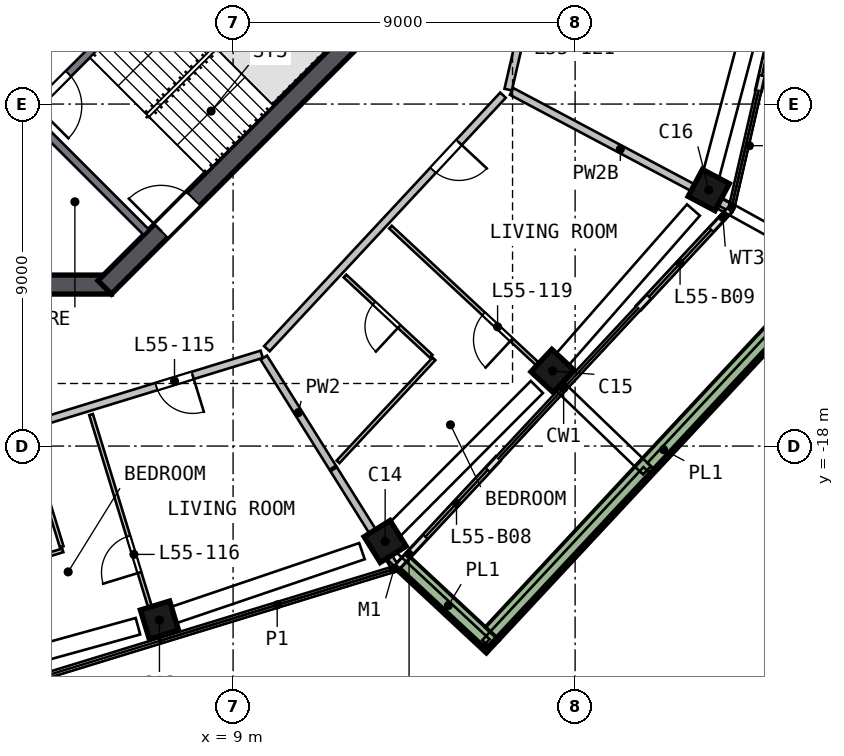
"""IFC4 building model, lengths in metres.
Left out: names, types, materials, properties, quantities, classifications, styles, units other than length and angle.
Written with IfcOpenShell. Run it as: python <this file> out.ifc"""

import sys

from ifc_helpers import new_model, si_unit, direction, frame, frame_2d, origin, origin_2d, place, context, subcontext, project, spatial, rectangle, extrude, element, fill, save


model = new_model("IFC4")
c1 = context("Model", 3, precision=1e-05, world=origin(), true_north=direction((0.0, 1.0)))
c2 = subcontext(c1, "Body", "Model", "MODEL_VIEW")
j1 = project(units=[si_unit("LENGTHUNIT", "METRE"), si_unit("PLANEANGLEUNIT", "RADIAN")], contexts=[c1])
p1 = place(None, origin())
s1 = spatial("IfcSite", under=j1, at=p1, CompositionType="ELEMENT")
p2 = place(p1, origin())
s2 = spatial("IfcBuilding", under=s1, at=p2, CompositionType="ELEMENT")
p3 = place(p2, frame((0.0, 0.0, 227.0)))
s3 = spatial("IfcBuildingStorey", under=s2, at=p3, CompositionType="ELEMENT", Elevation=227.0)
p4 = place(p3, frame((6.933, -22.62, 0.0), z_axis=(0.107304475, 0.033841596, 0.993650087), x_axis=(0.950141415, 0.290813838, -0.112510462)))
e1 = element("IfcColumn", 1, at=p4, inside=s3, PredefinedType="COLUMN", context=c2, shape_type="SweptSolid", body=[
    extrude(rectangle(XDim=0.8, YDim=0.8, at=origin_2d()), origin(), (0.0, 0.0, 1.0), 3.21),
])
p5 = place(p3, frame((12.884, -20.587, 0.0), z_axis=(0.097384519, 0.062110189, 0.993306891), x_axis=(-0.841980994, -0.52699861, 0.115500958)))
e2 = element("IfcColumn", 2, at=p5, inside=s3, PredefinedType="COLUMN", context=c2, shape_type="SweptSolid", body=[
    extrude(rectangle(XDim=0.8, YDim=0.8, at=origin_2d()), origin(), (0.0, 0.0, 1.0), 3.211),
])
p6 = place(p3, frame((17.314, -16.123, 0.0), z_axis=(0.075972627, 0.082969105, 0.993651995), x_axis=(0.677234205, 0.727116922, -0.112493612)))
e3 = element("IfcColumn", 3, at=p6, inside=s3, PredefinedType="COLUMN", context=c2, shape_type="SweptSolid", body=[
    extrude(rectangle(XDim=0.8, YDim=0.8, at=origin_2d()), origin(), (0.0, 0.0, 1.0), 3.21),
])
p7 = place(p3, frame((21.451, -11.386, 0.0), z_axis=(0.053292013, 0.10240277, 0.993314469), x_axis=(-0.466021288, -0.877210773, 0.115435775)))
e4 = element("IfcColumn", 4, at=p7, inside=s3, PredefinedType="COLUMN", context=c2, shape_type="SweptSolid", body=[
    extrude(rectangle(XDim=0.8, YDim=0.8, at=origin_2d()), origin(), (0.0, 0.0, 1.0), 3.211),
])
p8 = place(p3, frame((-5.799, -13.75, 0.0), z_axis=(0.0, 0.0, 1.0), x_axis=(1.0, 0.0, 0.0)))
e5 = element("IfcWall", 5, at=p8, inside=s3, PredefinedType="SHEAR", context=c2, shape_type="SweptSolid", body=[
    extrude(rectangle(XDim=11.598, YDim=0.5, at=frame_2d((5.799, 0.0))), origin(), (0.0, 0.0, 1.0), 3.5),
])
p9 = place(p3, frame((5.622, -13.823, 0.0), z_axis=(0.0, 0.0, 1.0), x_axis=(0.707106781, 0.707106781, 0.0)))
e6 = element("IfcWall", 6, at=p9, inside=s3, PredefinedType="SHEAR", context=c2, shape_type="SweptSolid", body=[
    extrude(rectangle(XDim=11.598, YDim=0.5, at=frame_2d((5.799, 0.0))), origin(), (0.0, 0.0, 1.0), 3.5),
])
p10 = place(p9, frame((2.099, 0.0, 0.0)))
e7 = element("IfcOpeningElement", 7, at=p10, cuts=e6, PredefinedType="OPENING", context=c2, shape_type="SweptSolid", body=[
    extrude(rectangle(XDim=1.2, YDim=2.1, at=frame_2d((0.6, 1.05))), frame((0.0, 0.26, 0.0), z_axis=(0.0, -1.0, 0.0), x_axis=(1.0, 0.0, 0.0)), (0.0, 0.0, 1.0), 0.52),
])
p11 = place(p3, frame((13.337, -21.164, 0.0), z_axis=(0.0, 0.0, 1.0), x_axis=(0.681473392, 0.73184289, 0.0)))
e8 = element("IfcWall", 8, at=p11, inside=s3, PredefinedType="SOLIDWALL", context=c2, shape_type="SweptSolid", body=[
    extrude(rectangle(XDim=3.863, YDim=0.15, at=frame_2d((1.932, 0.0))), origin(), (0.0, 0.0, 1.0), 2.525),
])
p12 = place(p11, frame((1.063, 0.0, 0.0)))
e9 = element("IfcOpeningElement", 9, at=p12, cuts=e8, PredefinedType="OPENING", context=c2, shape_type="SweptSolid", body=[
    extrude(rectangle(XDim=2.4, YDim=2.4, at=frame_2d((1.2, 1.2))), frame((0.0, 0.085, 0.0), z_axis=(0.0, -1.0, 0.0), x_axis=(1.0, 0.0, 0.0)), (0.0, 0.0, 1.0), 0.17),
])
p13 = place(p3, frame((19.671, -14.361, 0.0), z_axis=(0.0, 0.0, 1.0), x_axis=(0.681543353, 0.731777738, 0.0)))
e10 = element("IfcWall", 10, at=p13, inside=s3, PredefinedType="SOLIDWALL", context=c2, shape_type="SweptSolid", body=[
    extrude(rectangle(XDim=3.504, YDim=0.15, at=frame_2d((1.752, 0.0))), origin(), (0.0, 0.0, 1.0), 2.525),
])
p14 = place(p13, frame((0.4, 0.0, 0.0)))
e11 = element("IfcOpeningElement", 11, at=p14, cuts=e10, PredefinedType="OPENING", context=c2, shape_type="SweptSolid", body=[
    extrude(rectangle(XDim=2.4, YDim=2.4, at=frame_2d((1.2, 1.2))), frame((0.0, 0.085, 0.0), z_axis=(0.0, -1.0, 0.0), x_axis=(1.0, 0.0, 0.0)), (0.0, 0.0, 1.0), 0.17),
])
p15 = place(p3, frame((22.827, -8.64, 0.0), z_axis=(0.0, 0.0, 1.0), x_axis=(0.224302968, 0.97451946, 0.0)))
e12 = element("IfcWall", 12, at=p15, inside=s3, PredefinedType="SOLIDWALL", context=c2, shape_type="SweptSolid", body=[
    extrude(rectangle(XDim=3.3, YDim=0.15, at=frame_2d((1.65, 0.0))), origin(), (0.0, 0.0, 1.0), 2.525),
])
p16 = place(p15, frame((0.4, 0.0, 0.0)))
e13 = element("IfcOpeningElement", 13, at=p16, cuts=e12, PredefinedType="OPENING", context=c2, shape_type="SweptSolid", body=[
    extrude(rectangle(XDim=2.4, YDim=2.4, at=frame_2d((1.2, 1.2))), frame((0.0, 0.085, 0.0), z_axis=(0.0, -1.0, 0.0), x_axis=(1.0, 0.0, 0.0)), (0.0, 0.0, 1.0), 0.17),
])
p17 = place(p3, frame((13.494, -21.106, 0.0), z_axis=(0.0, 0.0, 1.0), x_axis=(0.731844096, -0.681472097, 0.0)))
e14 = element("IfcWall", 14, at=p17, inside=s3, PredefinedType="SOLIDWALL", context=c2, shape_type="SweptSolid", body=[
    extrude(rectangle(XDim=3.199, YDim=0.5, at=frame_2d((1.6, 0.0))), origin(), (0.0, 0.0, 1.0), 0.7),
])
p18 = place(p3, frame((15.823, -22.933, 0.0), z_axis=(0.0, 0.0, 1.0), x_axis=(0.681484345, 0.731832691, 0.0)))
e15 = element("IfcWall", 15, at=p18, inside=s3, PredefinedType="SOLIDWALL", context=c2, shape_type="SweptSolid", body=[
    extrude(rectangle(XDim=13.223, YDim=0.5, at=frame_2d((6.612, 0.0))), origin(), (0.0, 0.0, 1.0), 0.7),
])
p19 = place(p3, frame((9.629, -3.24, 0.0), z_axis=(0.0, 0.0, 1.0), x_axis=(-0.707120946, -0.707092617, 0.0)))
e16 = element("IfcWall", 16, at=p19, inside=s3, PredefinedType="SOLIDWALL", context=c2, shape_type="SweptSolid", body=[
    extrude(rectangle(XDim=8.618, YDim=0.2, at=frame_2d((4.309, 0.0))), origin(), (0.0, 0.0, 1.0), 3.19),
])
p20 = place(p19, frame((7.018, 0.0, 0.0)))
e17 = element("IfcOpeningElement", 17, at=p20, cuts=e16, PredefinedType="OPENING", context=c2, shape_type="SweptSolid", body=[
    extrude(rectangle(XDim=1.2, YDim=2.1, at=frame_2d((0.6, 1.05))), frame((0.0, 0.11, 0.0), z_axis=(0.0, -1.0, 0.0), x_axis=(1.0, 0.0, 0.0)), (0.0, 0.0, 1.0), 0.22),
])
p21 = place(p3, frame((3.677, -9.334, 0.0), z_axis=(0.0, 0.0, 1.0), x_axis=(0.707078393, -0.707135168, 0.0)))
e18 = element("IfcWall", 18, at=p21, inside=s3, PredefinedType="SOLIDWALL", context=c2, shape_type="SweptSolid", body=[
    extrude(rectangle(XDim=4.3, YDim=0.2, at=frame_2d((2.15, 0.0))), origin(), (0.0, 0.0, 1.0), 3.19),
])
p22 = place(p3, frame((9.753, -15.584, 0.0), z_axis=(0.0, 0.0, 1.0), x_axis=(-0.956105904, -0.293021329, 0.0)))
e19 = element("IfcWall", 19, at=p22, inside=s3, PredefinedType="SOLIDWALL", context=c2, shape_type="SweptSolid", body=[
    extrude(rectangle(XDim=9.317, YDim=0.2, at=frame_2d((4.658, 0.0))), origin(), (0.0, 0.0, 1.0), 3.19),
])
p23 = place(p22, frame((1.9, 0.0, 0.0)))
e20 = element("IfcOpeningElement", 20, at=p23, cuts=e19, PredefinedType="OPENING", context=c2, shape_type="SweptSolid", body=[
    extrude(rectangle(XDim=1.0, YDim=2.1, at=frame_2d((0.5, 1.05))), frame((0.0, 0.11, 0.0), z_axis=(0.0, -1.0, 0.0), x_axis=(1.0, 0.0, 0.0)), (0.0, 0.0, 1.0), 0.22),
])
p24 = place(p3, frame((16.103, -8.766, 0.0), z_axis=(0.0, 0.0, 1.0), x_axis=(-0.681485798, -0.731831338, 0.0)))
e21 = element("IfcWall", 21, at=p24, inside=s3, PredefinedType="SOLIDWALL", context=c2, shape_type="SweptSolid", body=[
    extrude(rectangle(XDim=9.117, YDim=0.2, at=frame_2d((4.558, 0.0))), origin(), (0.0, 0.0, 1.0), 3.19),
])
p25 = place(p24, frame((1.7, 0.0, 0.0)))
e22 = element("IfcOpeningElement", 22, at=p25, cuts=e21, PredefinedType="OPENING", context=c2, shape_type="SweptSolid", body=[
    extrude(rectangle(XDim=1.0, YDim=2.1, at=frame_2d((0.5, 1.05))), frame((0.0, 0.11, 0.0), z_axis=(0.0, -1.0, 0.0), x_axis=(1.0, 0.0, 0.0)), (0.0, 0.0, 1.0), 0.22),
])
p26 = place(p3, frame((18.328, 0.459, 0.0), z_axis=(0.0, 0.0, 1.0), x_axis=(-0.224285322, -0.974523522, 0.0)))
e23 = element("IfcWall", 23, at=p26, inside=s3, PredefinedType="SOLIDWALL", context=c2, shape_type="SweptSolid", body=[
    extrude(rectangle(XDim=9.317, YDim=0.2, at=frame_2d((4.658, 0.0))), origin(), (0.0, 0.0, 1.0), 3.19),
])
p27 = place(p26, frame((6.458, 0.0, 0.0)))
e24 = element("IfcOpeningElement", 24, at=p27, cuts=e23, PredefinedType="OPENING", context=c2, shape_type="SweptSolid", body=[
    extrude(rectangle(XDim=1.0, YDim=2.1, at=frame_2d((0.5, 1.05))), frame((0.0, 0.11, 0.0), z_axis=(0.0, -1.0, 0.0), x_axis=(1.0, 0.0, 0.0)), (0.0, 0.0, 1.0), 0.22),
])
p28 = place(p3, frame((9.808, -15.672, 0.0), z_axis=(0.0, 0.0, 1.0), x_axis=(0.530506006, -0.847681177, 0.0)))
e25 = element("IfcWall", 25, at=p28, inside=s3, PredefinedType="SOLIDWALL", context=c2, shape_type="SweptSolid", body=[
    extrude(rectangle(XDim=3.418, YDim=0.2, at=frame_2d((1.709, 0.0))), origin(), (0.0, 0.0, 1.0), 3.19),
])
p29 = place(p3, frame((11.646, -18.609, 0.0), z_axis=(0.0, 0.0, 1.0), x_axis=(0.530523518, -0.847670217, 0.0)))
e26 = element("IfcWall", 26, at=p29, inside=s3, PredefinedType="SOLIDWALL", context=c2, shape_type="SweptSolid", body=[
    extrude(rectangle(XDim=3.011, YDim=0.2, at=frame_2d((1.506, 0.0))), origin(), (0.0, 0.0, 1.0), 3.19),
])
p30 = place(p3, frame((16.33, -8.668, 0.0), z_axis=(0.0, 0.0, 1.0), x_axis=(0.883258213, -0.468886904, 0.0)))
e27 = element("IfcWall", 27, at=p30, inside=s3, PredefinedType="SOLIDWALL", context=c2, shape_type="SweptSolid", body=[
    extrude(rectangle(XDim=6.476, YDim=0.2, at=frame_2d((3.238, 0.0))), origin(), (0.0, 0.0, 1.0), 2.69),
])
p31 = place(p3, frame((0.978, -21.83, 0.0), z_axis=(0.0, 0.0, 1.0), x_axis=(0.956094847, 0.293057407, 0.0)))
e28 = element("IfcWall", 28, at=p31, inside=s3, PredefinedType="PARTITIONING", context=c2, shape_type="SweptSolid", body=[
    extrude(rectangle(XDim=3.704, YDim=0.1, at=frame_2d((1.852, 0.0))), origin(), (0.0, 0.0, 1.0), 3.19),
])
p32 = place(p3, frame((4.49, -20.649, 0.0), z_axis=(0.0, 0.0, 1.0), x_axis=(-0.293050781, 0.956096878, 0.0)))
e29 = element("IfcWall", 29, at=p32, inside=s3, PredefinedType="PARTITIONING", context=c2, shape_type="SweptSolid", body=[
    extrude(rectangle(XDim=3.1, YDim=0.1, at=frame_2d((1.55, 0.0))), origin(), (0.0, 0.0, 1.0), 3.19),
])
p33 = place(p32, frame((1.15, 0.0, 0.0)))
e30 = element("IfcOpeningElement", 30, at=p33, cuts=e29, PredefinedType="OPENING", context=c2, shape_type="SweptSolid", body=[
    extrude(rectangle(XDim=0.9, YDim=2.1, at=frame_2d((0.45, 1.05))), frame((0.0, 0.06, 0.0), z_axis=(0.0, -1.0, 0.0), x_axis=(1.0, 0.0, 0.0)), (0.0, 0.0, 1.0), 0.12),
])
p34 = place(p3, frame((7.065, -23.05, 0.0), z_axis=(0.0, 0.0, 1.0), x_axis=(-0.293042397, 0.956099448, 0.0)))
e31 = element("IfcWall", 31, at=p34, inside=s3, PredefinedType="PARTITIONING", context=c2, shape_type="SweptSolid", body=[
    extrude(rectangle(XDim=6.15, YDim=0.1, at=frame_2d((3.075, 0.0))), origin(), (0.0, 0.0, 1.0), 3.19),
])
p35 = place(p34, frame((1.8, 0.0, 0.0)))
e32 = element("IfcOpeningElement", 32, at=p35, cuts=e31, PredefinedType="OPENING", context=c2, shape_type="SweptSolid", body=[
    extrude(rectangle(XDim=1.0, YDim=2.1, at=frame_2d((0.5, 1.05))), frame((0.0, 0.06, 0.0), z_axis=(0.0, -1.0, 0.0), x_axis=(1.0, 0.0, 0.0)), (0.0, 0.0, 1.0), 0.12),
])
p36 = place(p3, frame((11.762, -18.417, 0.0), z_axis=(0.0, 0.0, 1.0), x_axis=(0.681479401, 0.731837295, 0.0)))
e33 = element("IfcWall", 33, at=p36, inside=s3, PredefinedType="PARTITIONING", context=c2, shape_type="SweptSolid", body=[
    extrude(rectangle(XDim=3.704, YDim=0.1, at=frame_2d((1.852, 0.0))), origin(), (0.0, 0.0, 1.0), 3.19),
])
p37 = place(p3, frame((14.213, -15.638, 0.0), z_axis=(0.0, 0.0, 1.0), x_axis=(-0.73185876, 0.681456349, 0.0)))
e34 = element("IfcWall", 34, at=p37, inside=s3, PredefinedType="PARTITIONING", context=c2, shape_type="SweptSolid", body=[
    extrude(rectangle(XDim=3.1, YDim=0.1, at=frame_2d((1.55, 0.0))), origin(), (0.0, 0.0, 1.0), 3.19),
])
p38 = place(p37, frame((1.15, 0.0, 0.0)))
e35 = element("IfcOpeningElement", 35, at=p38, cuts=e34, PredefinedType="OPENING", context=c2, shape_type="SweptSolid", body=[
    extrude(rectangle(XDim=0.9, YDim=2.1, at=frame_2d((0.45, 1.05))), frame((0.0, 0.06, 0.0), z_axis=(0.0, -1.0, 0.0), x_axis=(1.0, 0.0, 0.0)), (0.0, 0.0, 1.0), 0.12),
])
p39 = place(p3, frame((17.643, -16.429, 0.0), z_axis=(0.0, 0.0, 1.0), x_axis=(-0.731845502, 0.681470587, 0.0)))
e36 = element("IfcWall", 36, at=p39, inside=s3, PredefinedType="PARTITIONING", context=c2, shape_type="SweptSolid", body=[
    extrude(rectangle(XDim=6.15, YDim=0.1, at=frame_2d((3.075, 0.0))), origin(), (0.0, 0.0, 1.0), 3.19),
])
p40 = place(p39, frame((1.8, 0.0, 0.0)))
e37 = element("IfcOpeningElement", 37, at=p40, cuts=e36, PredefinedType="OPENING", context=c2, shape_type="SweptSolid", body=[
    extrude(rectangle(XDim=1.0, YDim=2.1, at=frame_2d((0.5, 1.05))), frame((0.0, 0.06, 0.0), z_axis=(0.0, -1.0, 0.0), x_axis=(1.0, 0.0, 0.0)), (0.0, 0.0, 1.0), 0.12),
])
p41 = place(p12, origin())
e38 = element("IfcDoor", 38, at=p41, inside=s3, OperationType="SLIDING_TO_LEFT", PredefinedType="DOOR", context=c2, shape_type="SweptSolid", body=[
    extrude(rectangle(XDim=2.4, YDim=2.4, at=frame_2d((1.2, 1.2))), frame((0.0, 0.025, 0.0), z_axis=(0.0, -1.0, 0.0), x_axis=(1.0, 0.0, 0.0)), (0.0, 0.0, 1.0), 0.05),
])
fill(e9, e38)
p42 = place(p14, origin())
e39 = element("IfcDoor", 39, at=p42, inside=s3, OperationType="SLIDING_TO_RIGHT", PredefinedType="DOOR", context=c2, shape_type="SweptSolid", body=[
    extrude(rectangle(XDim=2.4, YDim=2.4, at=frame_2d((1.2, 1.2))), frame((0.0, 0.025, 0.0), z_axis=(0.0, -1.0, 0.0), x_axis=(1.0, 0.0, 0.0)), (0.0, 0.0, 1.0), 0.05),
])
fill(e11, e39)
p43 = place(p16, origin())
e40 = element("IfcDoor", 40, at=p43, inside=s3, OperationType="SLIDING_TO_RIGHT", PredefinedType="DOOR", context=c2, shape_type="SweptSolid", body=[
    extrude(rectangle(XDim=2.4, YDim=2.4, at=frame_2d((1.2, 1.2))), frame((0.0, 0.025, 0.0), z_axis=(0.0, -1.0, 0.0), x_axis=(1.0, 0.0, 0.0)), (0.0, 0.0, 1.0), 0.05),
])
fill(e13, e40)
p44 = place(p20, origin())
e41 = element("IfcDoor", 41, at=p44, inside=s3, OperationType="SINGLE_SWING_RIGHT", PredefinedType="DOOR", context=c2, shape_type="SweptSolid", body=[
    extrude(rectangle(XDim=1.2, YDim=2.1, at=frame_2d((0.6, 1.05))), frame((0.0, 0.025, 0.0), z_axis=(0.0, -1.0, 0.0), x_axis=(1.0, 0.0, 0.0)), (0.0, 0.0, 1.0), 0.05),
])
fill(e17, e41)
p45 = place(p10, origin())
e42 = element("IfcDoor", 42, at=p45, inside=s3, OperationType="SINGLE_SWING_LEFT", PredefinedType="DOOR", context=c2, shape_type="SweptSolid", body=[
    extrude(rectangle(XDim=1.2, YDim=2.1, at=frame_2d((0.6, 1.05))), frame((0.0, 0.025, 0.0), z_axis=(0.0, -1.0, 0.0), x_axis=(1.0, 0.0, 0.0)), (0.0, 0.0, 1.0), 0.05),
])
fill(e7, e42)
p46 = place(p23, origin())
e43 = element("IfcDoor", 43, at=p46, inside=s3, OperationType="SINGLE_SWING_LEFT", PredefinedType="DOOR", context=c2, shape_type="SweptSolid", body=[
    extrude(rectangle(XDim=1.0, YDim=2.1, at=frame_2d((0.5, 1.05))), frame((0.0, 0.025, 0.0), z_axis=(0.0, -1.0, 0.0), x_axis=(1.0, 0.0, 0.0)), (0.0, 0.0, 1.0), 0.05),
])
fill(e20, e43)
p47 = place(p35, origin())
e44 = element("IfcDoor", 44, at=p47, inside=s3, OperationType="SINGLE_SWING_LEFT", PredefinedType="DOOR", context=c2, shape_type="SweptSolid", body=[
    extrude(rectangle(XDim=1.0, YDim=2.1, at=frame_2d((0.5, 1.05))), frame((0.0, 0.025, 0.0), z_axis=(0.0, -1.0, 0.0), x_axis=(1.0, 0.0, 0.0)), (0.0, 0.0, 1.0), 0.05),
])
fill(e32, e44)
p48 = place(p25, origin())
e45 = element("IfcDoor", 45, at=p48, inside=s3, OperationType="SINGLE_SWING_LEFT", PredefinedType="DOOR", context=c2, shape_type="SweptSolid", body=[
    extrude(rectangle(XDim=1.0, YDim=2.1, at=frame_2d((0.5, 1.05))), frame((0.0, 0.025, 0.0), z_axis=(0.0, -1.0, 0.0), x_axis=(1.0, 0.0, 0.0)), (0.0, 0.0, 1.0), 0.05),
])
fill(e22, e45)
p49 = place(p40, origin())
e46 = element("IfcDoor", 46, at=p49, inside=s3, OperationType="SINGLE_SWING_LEFT", PredefinedType="DOOR", context=c2, shape_type="SweptSolid", body=[
    extrude(rectangle(XDim=1.0, YDim=2.1, at=frame_2d((0.5, 1.05))), frame((0.0, 0.025, 0.0), z_axis=(0.0, -1.0, 0.0), x_axis=(1.0, 0.0, 0.0)), (0.0, 0.0, 1.0), 0.05),
])
fill(e37, e46)
p50 = place(p38, origin())
e47 = element("IfcDoor", 47, at=p50, inside=s3, OperationType="SINGLE_SWING_LEFT", PredefinedType="DOOR", context=c2, shape_type="SweptSolid", body=[
    extrude(rectangle(XDim=0.9, YDim=2.1, at=frame_2d((0.45, 1.05))), frame((0.0, 0.025, 0.0), z_axis=(0.0, -1.0, 0.0), x_axis=(1.0, 0.0, 0.0)), (0.0, 0.0, 1.0), 0.05),
])
fill(e35, e47)
save(model, sys.argv[1])
